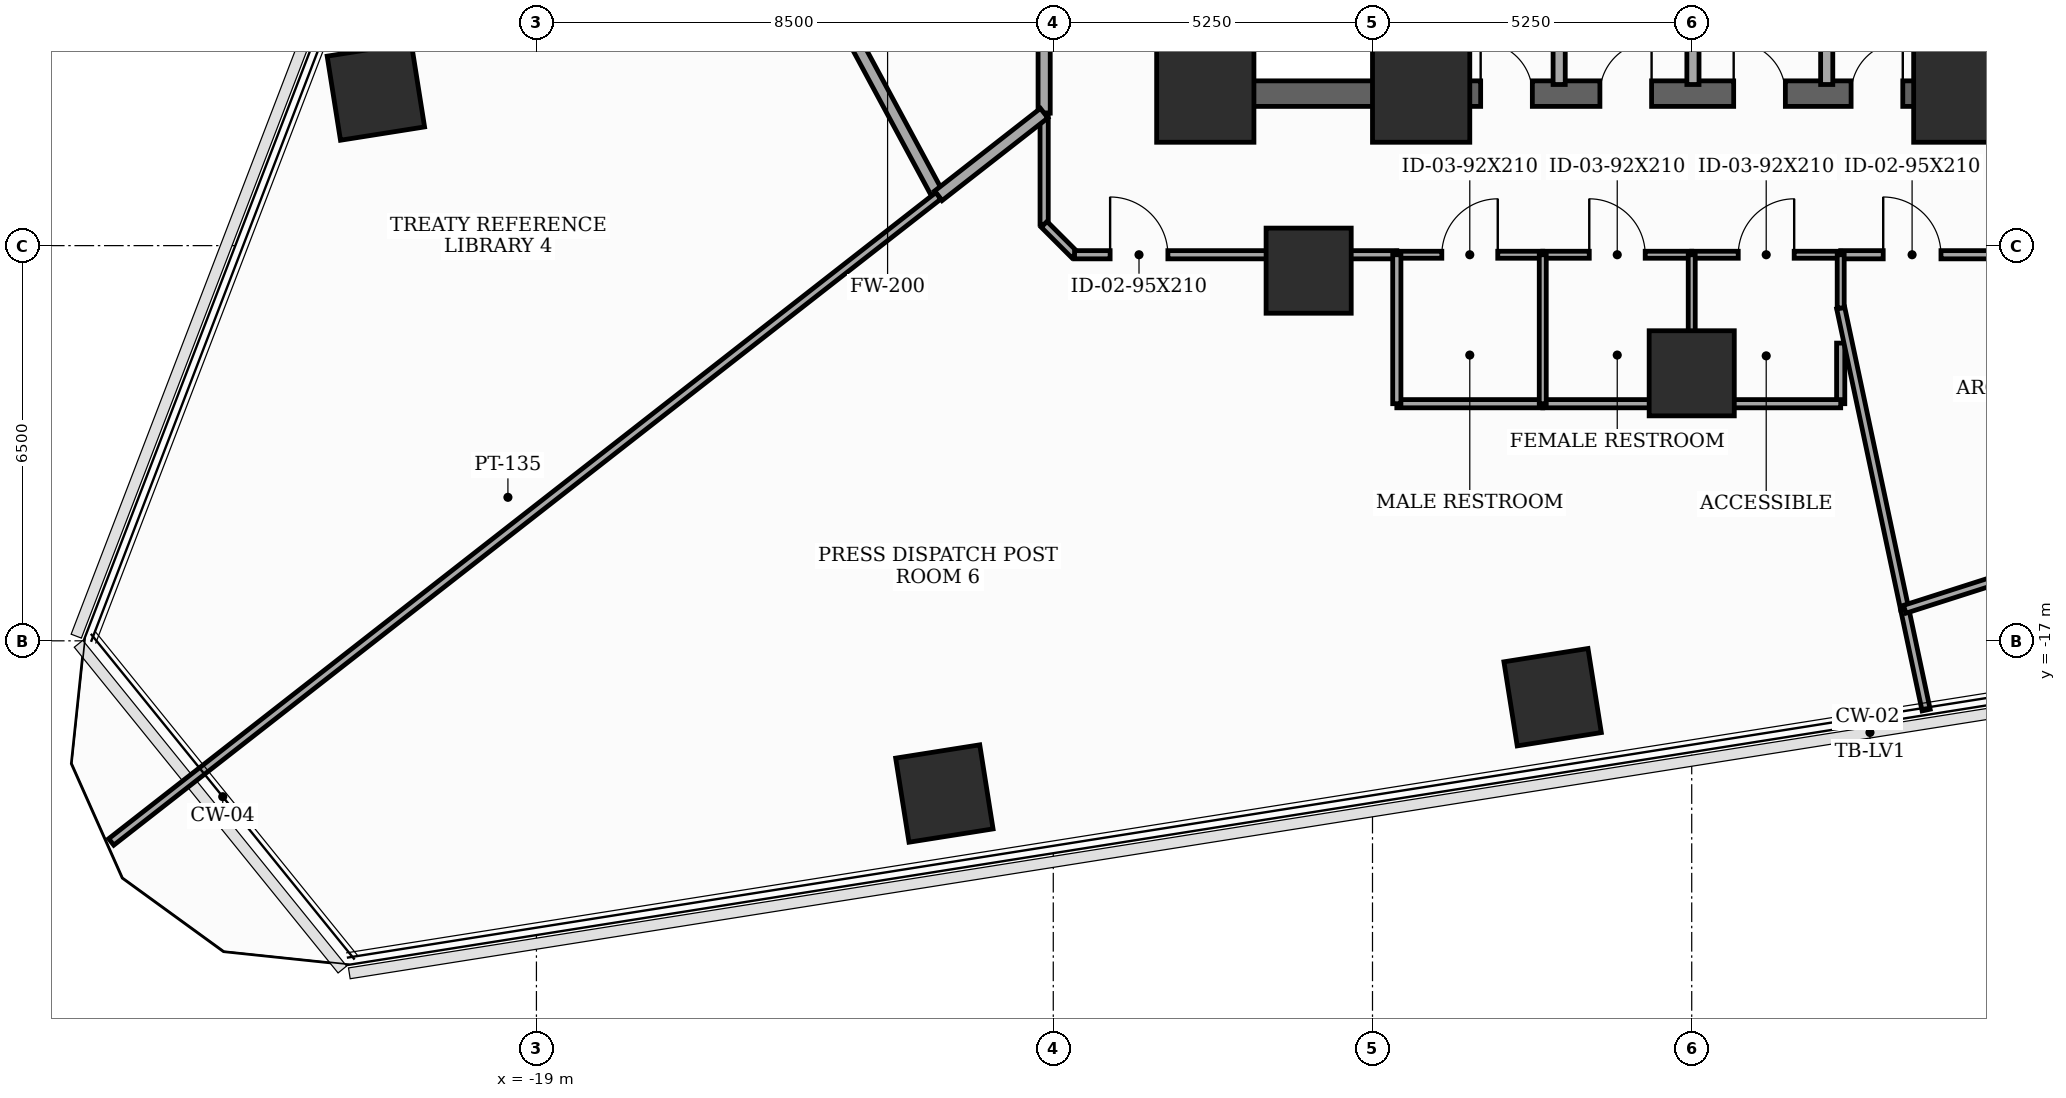
"""IFC4 building model, lengths in metres.
Left out: names, types, materials, properties, quantities, classifications, styles, units other than length and angle.
Written with IfcOpenShell. Run it as: python <this file> out.ifc"""

import sys

from ifc_helpers import new_model, si_unit, direction, frame, frame_2d, origin, origin_2d, place, context, subcontext, project, spatial, rectangle, extrude, element, fill, save


model = new_model("IFC4")
c1 = context("Model", 3, precision=1e-05, world=origin(), true_north=direction((0.0, 1.0)))
c2 = subcontext(c1, "Body", "Model", "MODEL_VIEW")
j1 = project(units=[si_unit("LENGTHUNIT", "METRE"), si_unit("PLANEANGLEUNIT", "RADIAN")], contexts=[c1])
p1 = place(None, origin())
s1 = spatial("IfcSite", under=j1, at=p1, CompositionType="ELEMENT")
p2 = place(p1, origin())
s2 = spatial("IfcBuilding", under=s1, at=p2, CompositionType="ELEMENT")
p3 = place(p2, frame((0.0, 0.0, 77.8)))
s3 = spatial("IfcBuildingStorey", under=s2, at=p3, CompositionType="ELEMENT", Elevation=77.8)
for number, where, z_axis, x_axis in (
    (1, (-8.0, -8.0, 0.0), (0.0, 0.0, 1.0), (1.0, 0.0, 0.0)),
    (2, (-4.45, -8.0, 0.0), (0.0, 0.0, 1.0), (1.0, 0.0, 0.0)),
    (3, (4.45, -8.0, 0.0), (0.0, 0.0, 1.0), (1.0, 0.0, 0.0)),
):
    element("IfcColumn", number, at=place(p3, frame(where, z_axis=z_axis, x_axis=x_axis)), inside=s3, PredefinedType="COLUMN", context=c2, shape_type="SweptSolid", body=[
        extrude(rectangle(XDim=1.6, YDim=1.6, at=origin_2d()), origin(), (0.0, 0.0, 1.0), 3.7),
    ])
for number, where, z_axis, x_axis in (
    (4, (-6.3, -10.912, 0.0), (0.0, 0.0, 1.0), (1.0, 0.0, 0.0)),
    (5, (0.0, -12.6, 0.0), (0.0, 0.0, 1.0), (1.0, 0.0, 0.0)),
    (6, (-12.291, -19.511, 0.0), (0.0, 0.0, 1.0), (0.988, 0.156, 0.0)),
    (7, (-2.288, -17.927, 0.0), (0.0, 0.0, 1.0), (0.988, 0.156, 0.0)),
    (8, (-21.641, -7.966, 0.0), (0.0, 0.0, 1.0), (0.988, 0.156, 0.0)),
):
    element("IfcColumn", number, at=place(p3, frame(where, z_axis=z_axis, x_axis=x_axis)), inside=s3, PredefinedType="COLUMN", context=c2, shape_type="SweptSolid", body=[
        extrude(rectangle(XDim=1.4, YDim=1.4, at=origin_2d()), origin(), (0.0, 0.0, 1.0), 3.7),
    ])
p4 = place(p3, frame((-8.0, -8.0, 0.0), z_axis=(0.0, 0.0, 1.0), x_axis=(0.0, 1.0, 0.0)))
e9 = element("IfcWall", 9, at=p4, inside=s3, PredefinedType="SHEAR", context=c2, shape_type="SweptSolid", body=[
    extrude(rectangle(XDim=16.0, YDim=0.42, at=frame_2d((8.0, 0.0))), origin(), (0.0, 0.0, 1.0), 3.5),
])
p5 = place(p4, frame((1.002, 0.0, 0.0)))
e10 = element("IfcOpeningElement", 10, at=p5, cuts=e9, PredefinedType="OPENING", context=c2, shape_type="SweptSolid", body=[
    extrude(rectangle(XDim=0.85, YDim=2.02, at=frame_2d((0.425, 1.01))), frame((0.0, 0.22, 0.0), z_axis=(0.0, -1.0, 0.0), x_axis=(1.0, 0.0, 0.0)), (0.0, 0.0, 1.0), 0.44),
])
p6 = place(p4, frame((5.35, 0.0, 0.0)))
e11 = element("IfcOpeningElement", 11, at=p6, cuts=e9, PredefinedType="OPENING", context=c2, shape_type="SweptSolid", body=[
    extrude(rectangle(XDim=1.05, YDim=2.15, at=frame_2d((0.525, 1.075))), frame((0.0, 0.22, 0.0), z_axis=(0.0, -1.0, 0.0), x_axis=(1.0, 0.0, 0.0)), (0.0, 0.0, 1.0), 0.44),
])
p7 = place(p3, frame((-8.0, -8.0, 0.0), z_axis=(0.0, 0.0, 1.0), x_axis=(1.0, 0.0, 0.0)))
e12 = element("IfcWall", 12, at=p7, inside=s3, PredefinedType="SHEAR", context=c2, shape_type="SweptSolid", body=[
    extrude(rectangle(XDim=16.0, YDim=0.42, at=frame_2d((8.0, 0.0))), origin(), (0.0, 0.0, 1.0), 3.5),
])
p8 = place(p7, frame((4.529, 0.0, 0.0)))
e13 = element("IfcOpeningElement", 13, at=p8, cuts=e12, PredefinedType="OPENING", context=c2, shape_type="SweptSolid", body=[
    extrude(rectangle(XDim=0.85, YDim=2.02, at=frame_2d((0.425, 1.01))), frame((0.0, 0.22, 0.0), z_axis=(0.0, -1.0, 0.0), x_axis=(1.0, 0.0, 0.0)), (0.0, 0.0, 1.0), 0.44),
])
p9 = place(p7, frame((6.49, 0.0, 0.0)))
e14 = element("IfcOpeningElement", 14, at=p9, cuts=e12, PredefinedType="OPENING", context=c2, shape_type="SweptSolid", body=[
    extrude(rectangle(XDim=0.85, YDim=2.02, at=frame_2d((0.425, 1.01))), frame((0.0, 0.22, 0.0), z_axis=(0.0, -1.0, 0.0), x_axis=(1.0, 0.0, 0.0)), (0.0, 0.0, 1.0), 0.44),
])
p10 = place(p7, frame((8.69, 0.0, 0.0)))
e15 = element("IfcOpeningElement", 15, at=p10, cuts=e12, PredefinedType="OPENING", context=c2, shape_type="SweptSolid", body=[
    extrude(rectangle(XDim=0.85, YDim=2.02, at=frame_2d((0.425, 1.01))), frame((0.0, 0.22, 0.0), z_axis=(0.0, -1.0, 0.0), x_axis=(1.0, 0.0, 0.0)), (0.0, 0.0, 1.0), 0.44),
])
p11 = place(p7, frame((10.621, 0.0, 0.0)))
e16 = element("IfcOpeningElement", 16, at=p11, cuts=e12, PredefinedType="OPENING", context=c2, shape_type="SweptSolid", body=[
    extrude(rectangle(XDim=0.85, YDim=2.02, at=frame_2d((0.425, 1.01))), frame((0.0, 0.22, 0.0), z_axis=(0.0, -1.0, 0.0), x_axis=(1.0, 0.0, 0.0)), (0.0, 0.0, 1.0), 0.44),
])
for number, where, z_axis, x_axis in (
    (17, (-4.45, -7.79, 0.0), (0.0, 0.0, 1.0), (0.0, 1.0, 0.0)),
    (18, (4.45, -7.79, 0.0), (0.0, 0.0, 1.0), (0.0, 1.0, 0.0)),
):
    element("IfcWall", number, at=place(p3, frame(where, z_axis=z_axis, x_axis=x_axis)), inside=s3, PredefinedType="SHEAR", context=c2, shape_type="SweptSolid", body=[
        extrude(rectangle(XDim=15.58, YDim=0.3, at=frame_2d((7.79, 0.0))), origin(), (0.0, 0.0, 1.0), 3.5),
    ])
p12 = place(p3, frame((4.45, -7.26, 0.0), z_axis=(0.0, 0.0, 1.0), x_axis=(1.0, 0.0, 0.0)))
e19 = element("IfcWall", 19, at=p12, inside=s3, PredefinedType="SHEAR", context=c2, shape_type="SweptSolid", body=[
    extrude(rectangle(XDim=3.55, YDim=0.3, at=frame_2d((1.775, 0.0))), origin(), (0.0, 0.0, 1.0), 3.5),
])
for number, where, z_axis, x_axis in (
    (20, (-2.18, -7.85, 0.0), (0.0, 0.0, 1.0), (0.0, 1.0, 0.0)),
    (21, (0.02, -7.85, 0.0), (0.0, 0.0, 1.0), (0.0, 1.0, 0.0)),
    (22, (2.22, -7.85, 0.0), (0.0, 0.0, 1.0), (0.0, 1.0, 0.0)),
):
    element("IfcWall", number, at=place(p3, frame(where, z_axis=z_axis, x_axis=x_axis)), inside=s3, PredefinedType="SOLIDWALL", context=c2, shape_type="SweptSolid", body=[
        extrude(rectangle(XDim=2.95, YDim=0.2, at=frame_2d((1.475, 0.0))), origin(), (0.0, 0.0, 1.0), 2.885),
    ])
p13 = place(p3, frame((-10.65, -3.992, 0.0), z_axis=(0.0, 0.0, 1.0), x_axis=(0.0, -1.0, 0.0)))
e23 = element("IfcWall", 23, at=p13, inside=s3, PredefinedType="SOLIDWALL", context=c2, shape_type="SweptSolid", body=[
    extrude(rectangle(XDim=4.329, YDim=0.2, at=frame_2d((2.165, 0.0))), origin(), (0.0, 0.0, 1.0), 2.785),
])
p14 = place(p3, frame((-10.65, -8.321, 0.0), z_axis=(0.0, 0.0, 1.0), x_axis=(0.0, -1.0, 0.0)))
e24 = element("IfcWall", 24, at=p14, inside=s3, PredefinedType="PARTITIONING", context=c2, shape_type="SweptSolid", body=[
    extrude(rectangle(XDim=1.829, YDim=0.135, at=frame_2d((0.915, 0.0))), origin(), (0.0, 0.0, 1.0), 3.5),
])
p15 = place(p3, frame((-10.65, -10.15, 0.0), z_axis=(0.0, 0.0, 1.0), x_axis=(0.707106781187, -0.707106781187, 0.0)))
e25 = element("IfcWall", 25, at=p15, inside=s3, PredefinedType="PARTITIONING", context=c2, shape_type="SweptSolid", body=[
    extrude(rectangle(XDim=0.707, YDim=0.135, at=frame_2d((0.354, 0.0))), origin(), (0.0, 0.0, 1.0), 3.5),
])
p16 = place(p3, frame((-10.15, -10.65, 0.0), z_axis=(0.0, 0.0, 1.0), x_axis=(1.0, 0.0, 0.0)))
e26 = element("IfcWall", 26, at=p16, inside=s3, PredefinedType="PARTITIONING", context=c2, shape_type="SweptSolid", body=[
    extrude(rectangle(XDim=5.3, YDim=0.135, at=frame_2d((2.65, 0.0))), origin(), (0.0, 0.0, 1.0), 2.785),
])
p17 = place(p16, frame((0.585, 0.0, 0.0)))
e27 = element("IfcOpeningElement", 27, at=p17, cuts=e26, PredefinedType="OPENING", context=c2, shape_type="SweptSolid", body=[
    extrude(rectangle(XDim=0.95, YDim=2.1, at=frame_2d((0.475, 1.05))), frame((0.0, 0.077, 0.0), z_axis=(0.0, -1.0, 0.0), x_axis=(1.0, 0.0, 0.0)), (0.0, 0.0, 1.0), 0.155),
])
p18 = place(p3, frame((-4.85, -10.65, 0.0), z_axis=(0.0, 0.0, 1.0), x_axis=(1.0, 0.0, 0.0)))
e28 = element("IfcWall", 28, at=p18, inside=s3, PredefinedType="PARTITIONING", context=c2, shape_type="SweptSolid", body=[
    extrude(rectangle(XDim=2.4, YDim=0.115, at=frame_2d((1.2, 0.0))), origin(), (0.0, 0.0, 1.0), 3.5),
])
p19 = place(p18, frame((0.74, 0.0, 0.0)))
e29 = element("IfcOpeningElement", 29, at=p19, cuts=e28, PredefinedType="OPENING", context=c2, shape_type="SweptSolid", body=[
    extrude(rectangle(XDim=0.92, YDim=2.1, at=frame_2d((0.46, 1.05))), frame((0.0, 0.067, 0.0), z_axis=(0.0, -1.0, 0.0), x_axis=(1.0, 0.0, 0.0)), (0.0, 0.0, 1.0), 0.135),
])
p20 = place(p3, frame((-2.45, -10.65, 0.0), z_axis=(0.0, 0.0, 1.0), x_axis=(1.0, 0.0, 0.0)))
e30 = element("IfcWall", 30, at=p20, inside=s3, PredefinedType="PARTITIONING", context=c2, shape_type="SweptSolid", body=[
    extrude(rectangle(XDim=2.45, YDim=0.115, at=frame_2d((1.225, 0.0))), origin(), (0.0, 0.0, 1.0), 2.785),
])
p21 = place(p20, frame((0.765, 0.0, 0.0)))
e31 = element("IfcOpeningElement", 31, at=p21, cuts=e30, PredefinedType="OPENING", context=c2, shape_type="SweptSolid", body=[
    extrude(rectangle(XDim=0.92, YDim=2.1, at=frame_2d((0.46, 1.05))), frame((0.0, 0.067, 0.0), z_axis=(0.0, -1.0, 0.0), x_axis=(1.0, 0.0, 0.0)), (0.0, 0.0, 1.0), 0.135),
])
p22 = place(p3, frame((0.0, -10.65, 0.0), z_axis=(0.0, 0.0, 1.0), x_axis=(1.0, 0.0, 0.0)))
e32 = element("IfcWall", 32, at=p22, inside=s3, PredefinedType="PARTITIONING", context=c2, shape_type="SweptSolid", body=[
    extrude(rectangle(XDim=2.45, YDim=0.115, at=frame_2d((1.225, 0.0))), origin(), (0.0, 0.0, 1.0), 3.5),
])
p23 = place(p22, frame((0.765, 0.0, 0.0)))
e33 = element("IfcOpeningElement", 33, at=p23, cuts=e32, PredefinedType="OPENING", context=c2, shape_type="SweptSolid", body=[
    extrude(rectangle(XDim=0.92, YDim=2.1, at=frame_2d((0.46, 1.05))), frame((0.0, 0.067, 0.0), z_axis=(0.0, -1.0, 0.0), x_axis=(1.0, 0.0, 0.0)), (0.0, 0.0, 1.0), 0.135),
])
p24 = place(p3, frame((2.45, -10.65, 0.0), z_axis=(0.0, 0.0, 1.0), x_axis=(1.0, 0.0, 0.0)))
e34 = element("IfcWall", 34, at=p24, inside=s3, PredefinedType="PARTITIONING", context=c2, shape_type="SweptSolid", body=[
    extrude(rectangle(XDim=5.871, YDim=0.135, at=frame_2d((2.936, 0.0))), origin(), (0.0, 0.0, 1.0), 2.785),
])
p25 = place(p24, frame((0.699, 0.0, 0.0)))
e35 = element("IfcOpeningElement", 35, at=p25, cuts=e34, PredefinedType="OPENING", context=c2, shape_type="SweptSolid", body=[
    extrude(rectangle(XDim=0.95, YDim=2.1, at=frame_2d((0.475, 1.05))), frame((0.0, 0.077, 0.0), z_axis=(0.0, -1.0, 0.0), x_axis=(1.0, 0.0, 0.0)), (0.0, 0.0, 1.0), 0.155),
])
p26 = place(p3, frame((-14.851, -5.118, 0.0), z_axis=(0.0, 0.0, 1.0), x_axis=(0.474543506137, -0.880232049395, 0.0)))
e36 = element("IfcWall", 36, at=p26, inside=s3, PredefinedType="SOLIDWALL", context=c2, shape_type="SweptSolid", body=[
    extrude(rectangle(XDim=5.184, YDim=0.2, at=frame_2d((2.592, 0.0))), origin(), (0.0, 0.0, 1.0), 2.785),
])
p27 = place(p3, frame((-12.391, -9.681, 0.0), z_axis=(0.0, 0.0, 1.0), x_axis=(0.788124883644, 0.615515367624, 0.0)))
e37 = element("IfcWall", 37, at=p27, inside=s3, PredefinedType="SOLIDWALL", context=c2, shape_type="SweptSolid", body=[
    extrude(rectangle(XDim=2.209, YDim=0.2, at=frame_2d((1.104, 0.0))), origin(), (0.0, 0.0, 1.0), 3.5),
])
p28 = place(p3, frame((-25.993, -20.307, 0.0), z_axis=(0.0, 0.0, 1.0), x_axis=(0.788017511585, 0.61565282541, 0.0)))
e38 = element("IfcWall", 38, at=p28, inside=s3, PredefinedType="PARTITIONING", context=c2, shape_type="SweptSolid", body=[
    extrude(rectangle(XDim=17.26, YDim=0.135, at=frame_2d((8.63, 0.0))), origin(), (0.0, 0.0, 1.0), 2.935),
])
p29 = place(p3, frame((-2.45, -13.1, 0.0), z_axis=(0.0, 0.0, 1.0), x_axis=(-1.0, 0.0, 0.0)))
e39 = element("IfcWall", 39, at=p29, inside=s3, PredefinedType="PARTITIONING", context=c2, shape_type="SweptSolid", body=[
    extrude(rectangle(XDim=2.4, YDim=0.135, at=frame_2d((1.2, 0.0))), origin(), (0.0, 0.0, 1.0), 3.5),
])
p30 = place(p3, frame((-4.85, -13.1, 0.0), z_axis=(0.0, 0.0, 1.0), x_axis=(0.0, 1.0, 0.0)))
e40 = element("IfcWall", 40, at=p30, inside=s3, PredefinedType="PARTITIONING", context=c2, shape_type="SweptSolid", body=[
    extrude(rectangle(XDim=2.45, YDim=0.135, at=frame_2d((1.225, 0.0))), origin(), (0.0, 0.0, 1.0), 2.785),
])
p31 = place(p3, frame((0.0, -13.1, 0.0), z_axis=(0.0, 0.0, 1.0), x_axis=(-1.0, 0.0, 0.0)))
e41 = element("IfcWall", 41, at=p31, inside=s3, PredefinedType="PARTITIONING", context=c2, shape_type="SweptSolid", body=[
    extrude(rectangle(XDim=2.45, YDim=0.135, at=frame_2d((1.225, 0.0))), origin(), (0.0, 0.0, 1.0), 2.785),
])
p32 = place(p3, frame((2.45, -12.103, 0.0), z_axis=(0.0, 0.0, 1.0), x_axis=(0.0, -1.0, 0.0)))
e42 = element("IfcWall", 42, at=p32, inside=s3, PredefinedType="PARTITIONING", context=c2, shape_type="SweptSolid", body=[
    extrude(rectangle(XDim=0.997, YDim=0.135, at=frame_2d((0.499, 0.0))), origin(), (0.0, 0.0, 1.0), 2.785),
])
p33 = place(p3, frame((2.45, -13.1, 0.0), z_axis=(0.0, 0.0, 1.0), x_axis=(-1.0, 0.0, 0.0)))
e43 = element("IfcWall", 43, at=p33, inside=s3, PredefinedType="PARTITIONING", context=c2, shape_type="SweptSolid", body=[
    extrude(rectangle(XDim=2.45, YDim=0.135, at=frame_2d((1.225, 0.0))), origin(), (0.0, 0.0, 1.0), 2.785),
])
p34 = place(p3, frame((3.503, -16.481, 0.0), z_axis=(0.0, 0.0, 1.0), x_axis=(-0.207863367053, 0.97815787102, 0.0)))
e44 = element("IfcWall", 44, at=p34, inside=s3, PredefinedType="PARTITIONING", context=c2, shape_type="SweptSolid", body=[
    extrude(rectangle(XDim=5.066, YDim=0.135, at=frame_2d((2.533, 0.0))), origin(), (0.0, 0.0, 1.0), 2.785),
])
p35 = place(p3, frame((3.855, -18.139, 0.0), z_axis=(0.0, 0.0, 1.0), x_axis=(-0.207875985054, 0.978155189547, 0.0)))
e45 = element("IfcWall", 45, at=p35, inside=s3, PredefinedType="PARTITIONING", context=c2, shape_type="SweptSolid", body=[
    extrude(rectangle(XDim=1.695, YDim=0.135, at=frame_2d((0.847, 0.0))), origin(), (0.0, 0.0, 1.0), 2.935),
])
for number, where, z_axis, x_axis in (
    (46, (-2.45, -13.1, 0.0), (0.0, 0.0, 1.0), (0.0, 1.0, 0.0)),
    (47, (0.0, -13.1, 0.0), (0.0, 0.0, 1.0), (0.0, 1.0, 0.0)),
):
    element("IfcWall", number, at=place(p3, frame(where, z_axis=z_axis, x_axis=x_axis)), inside=s3, PredefinedType="PARTITIONING", context=c2, shape_type="SweptSolid", body=[
        extrude(rectangle(XDim=2.45, YDim=0.115, at=frame_2d((1.225, 0.0))), origin(), (0.0, 0.0, 1.0), 2.785),
    ])
p36 = place(p3, frame((2.45, -11.526, 0.0), z_axis=(0.0, 0.0, 1.0), x_axis=(0.0, 1.0, 0.0)))
e48 = element("IfcWall", 48, at=p36, inside=s3, PredefinedType="PARTITIONING", context=c2, shape_type="SweptSolid", body=[
    extrude(rectangle(XDim=0.876, YDim=0.115, at=frame_2d((0.438, 0.0))), origin(), (0.0, 0.0, 1.0), 3.5),
])
p37 = place(p3, frame((3.503, -16.481, 0.0), z_axis=(0.0, 0.0, 1.0), x_axis=(0.952459752792, 0.304664437227, 0.0)))
e49 = element("IfcWall", 49, at=p37, inside=s3, PredefinedType="PARTITIONING", context=c2, shape_type="SweptSolid", body=[
    extrude(rectangle(XDim=3.821, YDim=0.135, at=frame_2d((1.91, 0.0))), origin(), (0.0, 0.0, 1.0), 3.5),
])
p38 = place(p8, origin())
e50 = element("IfcDoor", 50, at=p38, inside=s3, OperationType="SINGLE_SWING_LEFT", PredefinedType="TRAPDOOR", context=c2, shape_type="SweptSolid", body=[
    extrude(rectangle(XDim=0.85, YDim=2.02, at=frame_2d((0.425, 1.01))), frame((0.0, 0.025, 0.0), z_axis=(0.0, -1.0, 0.0), x_axis=(1.0, 0.0, 0.0)), (0.0, 0.0, 1.0), 0.05),
])
fill(e13, e50)
p39 = place(p9, origin())
e51 = element("IfcDoor", 51, at=p39, inside=s3, OperationType="SINGLE_SWING_RIGHT", PredefinedType="TRAPDOOR", context=c2, shape_type="SweptSolid", body=[
    extrude(rectangle(XDim=0.85, YDim=2.02, at=frame_2d((0.425, 1.01))), frame((0.0, 0.025, 0.0), z_axis=(0.0, -1.0, 0.0), x_axis=(1.0, 0.0, 0.0)), (0.0, 0.0, 1.0), 0.05),
])
fill(e14, e51)
p40 = place(p10, origin())
e52 = element("IfcDoor", 52, at=p40, inside=s3, OperationType="SINGLE_SWING_LEFT", PredefinedType="TRAPDOOR", context=c2, shape_type="SweptSolid", body=[
    extrude(rectangle(XDim=0.85, YDim=2.02, at=frame_2d((0.425, 1.01))), frame((0.0, 0.025, 0.0), z_axis=(0.0, -1.0, 0.0), x_axis=(1.0, 0.0, 0.0)), (0.0, 0.0, 1.0), 0.05),
])
fill(e15, e52)
p41 = place(p11, origin())
e53 = element("IfcDoor", 53, at=p41, inside=s3, OperationType="SINGLE_SWING_RIGHT", PredefinedType="TRAPDOOR", context=c2, shape_type="SweptSolid", body=[
    extrude(rectangle(XDim=0.85, YDim=2.02, at=frame_2d((0.425, 1.01))), frame((0.0, 0.025, 0.0), z_axis=(0.0, -1.0, 0.0), x_axis=(1.0, 0.0, 0.0)), (0.0, 0.0, 1.0), 0.05),
])
fill(e16, e53)
p42 = place(p17, origin())
e54 = element("IfcDoor", 54, at=p42, inside=s3, OperationType="SINGLE_SWING_LEFT", PredefinedType="DOOR", context=c2, shape_type="SweptSolid", body=[
    extrude(rectangle(XDim=0.95, YDim=2.1, at=frame_2d((0.475, 1.05))), frame((0.0, 0.025, 0.0), z_axis=(0.0, -1.0, 0.0), x_axis=(1.0, 0.0, 0.0)), (0.0, 0.0, 1.0), 0.05),
])
fill(e27, e54)
p43 = place(p19, origin())
e55 = element("IfcDoor", 55, at=p43, inside=s3, OperationType="SINGLE_SWING_RIGHT", PredefinedType="DOOR", context=c2, shape_type="SweptSolid", body=[
    extrude(rectangle(XDim=0.92, YDim=2.1, at=frame_2d((0.46, 1.05))), frame((0.0, 0.025, 0.0), z_axis=(0.0, -1.0, 0.0), x_axis=(1.0, 0.0, 0.0)), (0.0, 0.0, 1.0), 0.05),
])
fill(e29, e55)
p44 = place(p21, origin())
e56 = element("IfcDoor", 56, at=p44, inside=s3, OperationType="SINGLE_SWING_LEFT", PredefinedType="DOOR", context=c2, shape_type="SweptSolid", body=[
    extrude(rectangle(XDim=0.92, YDim=2.1, at=frame_2d((0.46, 1.05))), frame((0.0, 0.025, 0.0), z_axis=(0.0, -1.0, 0.0), x_axis=(1.0, 0.0, 0.0)), (0.0, 0.0, 1.0), 0.05),
])
fill(e31, e56)
p45 = place(p23, origin())
e57 = element("IfcDoor", 57, at=p45, inside=s3, OperationType="SINGLE_SWING_RIGHT", PredefinedType="DOOR", context=c2, shape_type="SweptSolid", body=[
    extrude(rectangle(XDim=0.92, YDim=2.1, at=frame_2d((0.46, 1.05))), frame((0.0, 0.025, 0.0), z_axis=(0.0, -1.0, 0.0), x_axis=(1.0, 0.0, 0.0)), (0.0, 0.0, 1.0), 0.05),
])
fill(e33, e57)
p46 = place(p25, origin())
e58 = element("IfcDoor", 58, at=p46, inside=s3, OperationType="SINGLE_SWING_LEFT", PredefinedType="DOOR", context=c2, shape_type="SweptSolid", body=[
    extrude(rectangle(XDim=0.95, YDim=2.1, at=frame_2d((0.475, 1.05))), frame((0.0, 0.025, 0.0), z_axis=(0.0, -1.0, 0.0), x_axis=(1.0, 0.0, 0.0)), (0.0, 0.0, 1.0), 0.05),
])
fill(e35, e58)
save(model, sys.argv[1])
